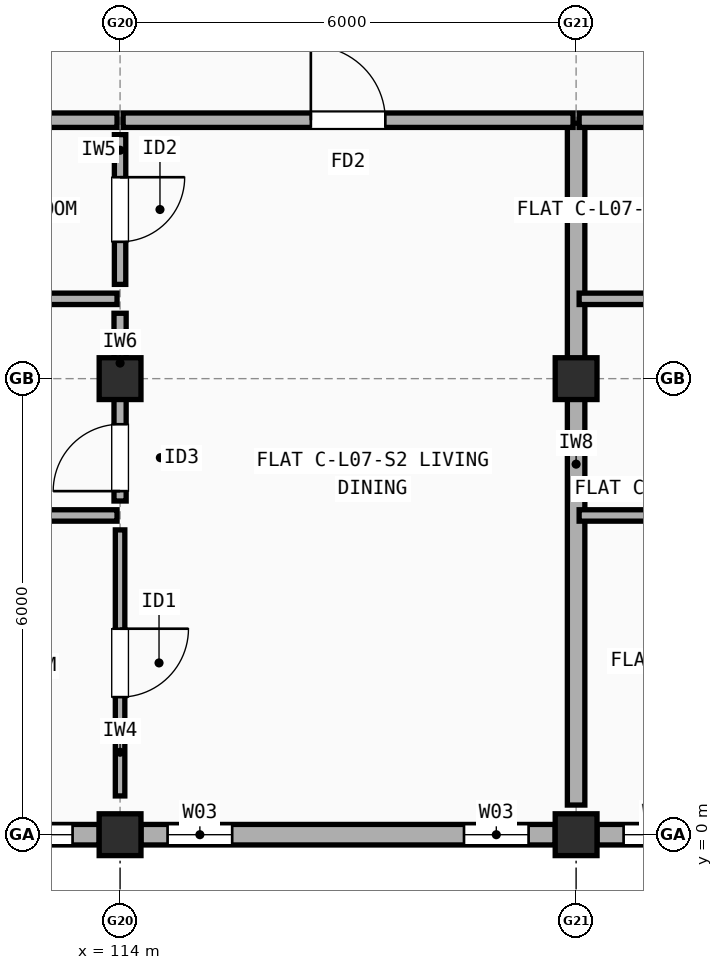
"""IFC4 building model, lengths in metres.
Left out: names, types, materials, properties, quantities, classifications, styles, units other than length and angle.
Written with IfcOpenShell. Run it as: python <this file> out.ifc"""

import sys

from ifc_helpers import new_model, si_unit, direction, frame, frame_2d, origin, origin_2d, place, context, subcontext, project, spatial, rectangle, extrude, element, fill, save


model = new_model("IFC4")
c1 = context("Model", 3, precision=1e-05, world=origin(), true_north=direction((0.0, 1.0)))
c2 = subcontext(c1, "Body", "Model", "MODEL_VIEW")
j1 = project(units=[si_unit("LENGTHUNIT", "METRE"), si_unit("PLANEANGLEUNIT", "RADIAN")], contexts=[c1])
p1 = place(None, origin())
s1 = spatial("IfcSite", under=j1, at=p1, CompositionType="ELEMENT")
p2 = place(p1, origin())
s2 = spatial("IfcBuilding", under=s1, at=p2, CompositionType="ELEMENT")
p3 = place(p2, frame((0.0, 0.0, 23.7)))
s3 = spatial("IfcBuildingStorey", under=s2, at=p3, CompositionType="ELEMENT", Elevation=23.7)
for number, where, z_axis, x_axis in (
    (1, (114.0, 0.0, 0.0), (0.0, 0.0, 1.0), (1.0, 0.0, 0.0)),
    (2, (114.0, 6.0, 0.0), (0.0, 0.0, 1.0), (1.0, 0.0, 0.0)),
    (3, (120.0, 0.0, 0.0), (0.0, 0.0, 1.0), (1.0, 0.0, 0.0)),
    (4, (120.0, 6.0, 0.0), (0.0, 0.0, 1.0), (1.0, 0.0, 0.0)),
):
    element("IfcColumn", number, at=place(p3, frame(where, z_axis=z_axis, x_axis=x_axis)), inside=s3, PredefinedType="COLUMN", context=c2, shape_type="SweptSolid", body=[
        extrude(rectangle(XDim=0.55, YDim=0.55, at=origin_2d()), origin(), (0.0, 0.0, 1.0), 2.975),
    ])
p4 = place(p3, frame((108.275, 0.0, 0.0), z_axis=(0.0, 0.0, 1.0), x_axis=(1.0, 0.0, 0.0)))
e5 = element("IfcWall", 5, at=p4, inside=s3, PredefinedType="STANDARD", context=c2, shape_type="SweptSolid", body=[
    extrude(rectangle(XDim=5.45, YDim=0.27, at=frame_2d((2.725, 0.0))), origin(), (0.0, 0.0, 1.0), 2.457),
])
p5 = place(p4, frame((1.615, 0.0, 0.9)))
e6 = element("IfcOpeningElement", 6, at=p5, cuts=e5, PredefinedType="OPENING", context=c2, shape_type="SweptSolid", body=[
    extrude(rectangle(XDim=1.2, YDim=1.35, at=frame_2d((0.6, 0.675))), frame((0.0, 0.145, 0.0), z_axis=(0.0, -1.0, 0.0), x_axis=(1.0, 0.0, 0.0)), (0.0, 0.0, 1.0), 0.29),
])
p6 = place(p4, frame((3.9, 0.0, 0.9)))
e7 = element("IfcOpeningElement", 7, at=p6, cuts=e5, PredefinedType="OPENING", context=c2, shape_type="SweptSolid", body=[
    extrude(rectangle(XDim=1.2, YDim=1.35, at=frame_2d((0.6, 0.675))), frame((0.0, 0.145, 0.0), z_axis=(0.0, -1.0, 0.0), x_axis=(1.0, 0.0, 0.0)), (0.0, 0.0, 1.0), 0.29),
])
p7 = place(p3, frame((114.275, 0.0, 0.0), z_axis=(0.0, 0.0, 1.0), x_axis=(1.0, 0.0, 0.0)))
e8 = element("IfcWall", 8, at=p7, inside=s3, PredefinedType="STANDARD", context=c2, shape_type="SweptSolid", body=[
    extrude(rectangle(XDim=5.45, YDim=0.27, at=frame_2d((2.725, 0.0))), origin(), (0.0, 0.0, 1.0), 2.457),
])
p8 = place(p7, frame((0.35, 0.0, 0.9)))
e9 = element("IfcOpeningElement", 9, at=p8, cuts=e8, PredefinedType="OPENING", context=c2, shape_type="SweptSolid", body=[
    extrude(rectangle(XDim=0.85, YDim=1.25, at=frame_2d((0.425, 0.625))), frame((0.0, 0.145, 0.0), z_axis=(0.0, -1.0, 0.0), x_axis=(1.0, 0.0, 0.0)), (0.0, 0.0, 1.0), 0.29),
])
p9 = place(p7, frame((4.25, 0.0, 0.9)))
e10 = element("IfcOpeningElement", 10, at=p9, cuts=e8, PredefinedType="OPENING", context=c2, shape_type="SweptSolid", body=[
    extrude(rectangle(XDim=0.85, YDim=1.25, at=frame_2d((0.425, 0.625))), frame((0.0, 0.145, 0.0), z_axis=(0.0, -1.0, 0.0), x_axis=(1.0, 0.0, 0.0)), (0.0, 0.0, 1.0), 0.29),
])
p10 = place(p3, frame((120.275, 0.0, 0.0), z_axis=(0.0, 0.0, 1.0), x_axis=(1.0, 0.0, 0.0)))
e11 = element("IfcWall", 11, at=p10, inside=s3, PredefinedType="STANDARD", context=c2, shape_type="SweptSolid", body=[
    extrude(rectangle(XDim=5.45, YDim=0.27, at=frame_2d((2.725, 0.0))), origin(), (0.0, 0.0, 1.0), 2.457),
])
p11 = place(p10, frame((0.35, 0.0, 0.9)))
e12 = element("IfcOpeningElement", 12, at=p11, cuts=e11, PredefinedType="OPENING", context=c2, shape_type="SweptSolid", body=[
    extrude(rectangle(XDim=0.95, YDim=1.35, at=frame_2d((0.475, 0.675))), frame((0.0, 0.145, 0.0), z_axis=(0.0, -1.0, 0.0), x_axis=(1.0, 0.0, 0.0)), (0.0, 0.0, 1.0), 0.29),
])
p12 = place(p10, frame((2.885, 0.0, 0.9)))
e13 = element("IfcOpeningElement", 13, at=p12, cuts=e11, PredefinedType="OPENING", context=c2, shape_type="SweptSolid", body=[
    extrude(rectangle(XDim=0.95, YDim=1.35, at=frame_2d((0.475, 0.675))), frame((0.0, 0.145, 0.0), z_axis=(0.0, -1.0, 0.0), x_axis=(1.0, 0.0, 0.0)), (0.0, 0.0, 1.0), 0.29),
])
p13 = place(p3, frame((120.0, 0.39, 0.0), z_axis=(0.0, 0.0, 1.0), x_axis=(0.0, 1.0, 0.0)))
e14 = element("IfcWall", 14, at=p13, inside=s3, PredefinedType="SOLIDWALL", context=c2, shape_type="SweptSolid", body=[
    extrude(rectangle(XDim=8.97, YDim=0.23, at=frame_2d((4.485, 0.0))), origin(), (0.0, 0.0, 1.0), 2.458),
])
p14 = place(p3, frame((109.54, 9.4, 0.0), z_axis=(0.0, 0.0, 1.0), x_axis=(1.0, 0.0, 0.0)))
e15 = element("IfcWall", 15, at=p14, inside=s3, PredefinedType="SOLIDWALL", context=c2, shape_type="SweptSolid", body=[
    extrude(rectangle(XDim=4.42, YDim=0.19, at=frame_2d((2.21, 0.0))), origin(), (0.0, 0.0, 1.0), 2.458),
])
p15 = place(p3, frame((114.04, 9.4, 0.0), z_axis=(0.0, 0.0, 1.0), x_axis=(1.0, 0.0, 0.0)))
e16 = element("IfcWall", 16, at=p15, inside=s3, PredefinedType="SOLIDWALL", context=c2, shape_type="SweptSolid", body=[
    extrude(rectangle(XDim=5.92, YDim=0.19, at=frame_2d((2.96, 0.0))), origin(), (0.0, 0.0, 1.0), 2.458),
])
p16 = place(p15, frame((2.47, 0.0, 0.0)))
e17 = element("IfcOpeningElement", 17, at=p16, cuts=e16, PredefinedType="OPENING", context=c2, shape_type="SweptSolid", body=[
    extrude(rectangle(XDim=0.98, YDim=2.15, at=frame_2d((0.49, 1.075))), frame((0.0, 0.105, 0.0), z_axis=(0.0, -1.0, 0.0), x_axis=(1.0, 0.0, 0.0)), (0.0, 0.0, 1.0), 0.21),
])
p17 = place(p3, frame((114.0, 0.51, 0.0), z_axis=(0.0, 0.0, 1.0), x_axis=(0.0, 1.0, 0.0)))
e18 = element("IfcWall", 18, at=p17, inside=s3, PredefinedType="PARTITIONING", context=c2, shape_type="SweptSolid", body=[
    extrude(rectangle(XDim=3.5, YDim=0.125, at=frame_2d((1.75, 0.0))), origin(), (0.0, 0.0, 1.0), 2.508),
])
p18 = place(p17, frame((1.3, 0.0, 0.0)))
e19 = element("IfcOpeningElement", 19, at=p18, cuts=e18, PredefinedType="OPENING", context=c2, shape_type="SweptSolid", body=[
    extrude(rectangle(XDim=0.9, YDim=2.1, at=frame_2d((0.45, 1.05))), frame((0.0, 0.073, 0.0), z_axis=(0.0, -1.0, 0.0), x_axis=(1.0, 0.0, 0.0)), (0.0, 0.0, 1.0), 0.145),
])
p19 = place(p3, frame((114.0, 4.39, 0.0), z_axis=(0.0, 0.0, 1.0), x_axis=(0.0, 1.0, 0.0)))
e20 = element("IfcWall", 20, at=p19, inside=s3, PredefinedType="PLUMBINGWALL", context=c2, shape_type="SweptSolid", body=[
    extrude(rectangle(XDim=2.47, YDim=0.16, at=frame_2d((1.235, 0.0))), origin(), (0.0, 0.0, 1.0), 2.458),
])
p20 = place(p19, frame((0.13, 0.0, 0.0)))
e21 = element("IfcOpeningElement", 21, at=p20, cuts=e20, PredefinedType="OPENING", context=c2, shape_type="SweptSolid", body=[
    extrude(rectangle(XDim=0.88, YDim=2.1, at=frame_2d((0.44, 1.05))), frame((0.0, 0.09, 0.0), z_axis=(0.0, -1.0, 0.0), x_axis=(1.0, 0.0, 0.0)), (0.0, 0.0, 1.0), 0.18),
])
p21 = place(p3, frame((114.0, 7.24, 0.0), z_axis=(0.0, 0.0, 1.0), x_axis=(0.0, 1.0, 0.0)))
e22 = element("IfcWall", 22, at=p21, inside=s3, PredefinedType="PARTITIONING", context=c2, shape_type="SweptSolid", body=[
    extrude(rectangle(XDim=1.97, YDim=0.15, at=frame_2d((0.985, 0.0))), origin(), (0.0, 0.0, 1.0), 2.458),
])
p22 = place(p21, frame((0.56, 0.0, 0.0)))
e23 = element("IfcOpeningElement", 23, at=p22, cuts=e22, PredefinedType="OPENING", context=c2, shape_type="SweptSolid", body=[
    extrude(rectangle(XDim=0.85, YDim=2.1, at=frame_2d((0.425, 1.05))), frame((0.0, 0.085, 0.0), z_axis=(0.0, -1.0, 0.0), x_axis=(1.0, 0.0, 0.0)), (0.0, 0.0, 1.0), 0.17),
])
p23 = place(p3, frame((109.54, 4.2, 0.0), z_axis=(0.0, 0.0, 1.0), x_axis=(1.0, 0.0, 0.0)))
e24 = element("IfcWall", 24, at=p23, inside=s3, PredefinedType="PARTITIONING", context=c2, shape_type="SweptSolid", body=[
    extrude(rectangle(XDim=4.42, YDim=0.15, at=frame_2d((2.21, 0.0))), origin(), (0.0, 0.0, 1.0), 2.508),
])
p24 = place(p3, frame((109.54, 7.05, 0.0), z_axis=(0.0, 0.0, 1.0), x_axis=(1.0, 0.0, 0.0)))
e25 = element("IfcWall", 25, at=p24, inside=s3, PredefinedType="PARTITIONING", context=c2, shape_type="SweptSolid", body=[
    extrude(rectangle(XDim=4.42, YDim=0.15, at=frame_2d((2.21, 0.0))), origin(), (0.0, 0.0, 1.0), 2.458),
])
p25 = place(p3, frame((120.04, 9.4, 0.0), z_axis=(0.0, 0.0, 1.0), x_axis=(1.0, 0.0, 0.0)))
e26 = element("IfcWall", 26, at=p25, inside=s3, PredefinedType="SOLIDWALL", context=c2, shape_type="SweptSolid", body=[
    extrude(rectangle(XDim=4.42, YDim=0.19, at=frame_2d((2.21, 0.0))), origin(), (0.0, 0.0, 1.0), 2.548),
])
p26 = place(p3, frame((120.04, 4.2, 0.0), z_axis=(0.0, 0.0, 1.0), x_axis=(1.0, 0.0, 0.0)))
e27 = element("IfcWall", 27, at=p26, inside=s3, PredefinedType="PARTITIONING", context=c2, shape_type="SweptSolid", body=[
    extrude(rectangle(XDim=4.42, YDim=0.15, at=frame_2d((2.21, 0.0))), origin(), (0.0, 0.0, 1.0), 2.458),
])
p27 = place(p3, frame((120.04, 7.05, 0.0), z_axis=(0.0, 0.0, 1.0), x_axis=(1.0, 0.0, 0.0)))
e28 = element("IfcWall", 28, at=p27, inside=s3, PredefinedType="PARTITIONING", context=c2, shape_type="SweptSolid", body=[
    extrude(rectangle(XDim=4.42, YDim=0.15, at=frame_2d((2.21, 0.0))), origin(), (0.0, 0.0, 1.0), 2.548),
])
p28 = place(p6, origin())
e29 = element("IfcWindow", 29, at=p28, inside=s3, PartitioningType="SINGLE_PANEL", PredefinedType="WINDOW", context=c2, shape_type="SweptSolid", body=[
    extrude(rectangle(XDim=1.2, YDim=1.35, at=frame_2d((0.6, 0.675))), frame((0.0, 0.03, 0.0), z_axis=(0.0, -1.0, 0.0), x_axis=(1.0, 0.0, 0.0)), (0.0, 0.0, 1.0), 0.06),
])
fill(e7, e29)
p29 = place(p8, origin())
e30 = element("IfcWindow", 30, at=p29, inside=s3, PartitioningType="SINGLE_PANEL", PredefinedType="WINDOW", context=c2, shape_type="SweptSolid", body=[
    extrude(rectangle(XDim=0.85, YDim=1.25, at=frame_2d((0.425, 0.625))), frame((0.0, 0.03, 0.0), z_axis=(0.0, -1.0, 0.0), x_axis=(1.0, 0.0, 0.0)), (0.0, 0.0, 1.0), 0.06),
])
fill(e9, e30)
p30 = place(p9, origin())
e31 = element("IfcWindow", 31, at=p30, inside=s3, PartitioningType="SINGLE_PANEL", PredefinedType="WINDOW", context=c2, shape_type="SweptSolid", body=[
    extrude(rectangle(XDim=0.85, YDim=1.25, at=frame_2d((0.425, 0.625))), frame((0.0, 0.03, 0.0), z_axis=(0.0, -1.0, 0.0), x_axis=(1.0, 0.0, 0.0)), (0.0, 0.0, 1.0), 0.06),
])
fill(e10, e31)
p31 = place(p11, origin())
e32 = element("IfcWindow", 32, at=p31, inside=s3, PartitioningType="SINGLE_PANEL", PredefinedType="WINDOW", context=c2, shape_type="SweptSolid", body=[
    extrude(rectangle(XDim=0.95, YDim=1.35, at=frame_2d((0.475, 0.675))), frame((0.0, 0.03, 0.0), z_axis=(0.0, -1.0, 0.0), x_axis=(1.0, 0.0, 0.0)), (0.0, 0.0, 1.0), 0.06),
])
fill(e12, e32)
p32 = place(p16, origin())
e33 = element("IfcDoor", 33, at=p32, inside=s3, OperationType="SINGLE_SWING_LEFT", PredefinedType="DOOR", context=c2, shape_type="SweptSolid", body=[
    extrude(rectangle(XDim=0.98, YDim=2.15, at=frame_2d((0.49, 1.075))), frame((0.0, 0.025, 0.0), z_axis=(0.0, -1.0, 0.0), x_axis=(1.0, 0.0, 0.0)), (0.0, 0.0, 1.0), 0.05),
])
fill(e17, e33)
p33 = place(p18, origin())
e34 = element("IfcDoor", 34, at=p33, inside=s3, OperationType="SINGLE_SWING_RIGHT", PredefinedType="DOOR", context=c2, shape_type="SweptSolid", body=[
    extrude(rectangle(XDim=0.9, YDim=2.1, at=frame_2d((0.45, 1.05))), frame((0.0, 0.025, 0.0), z_axis=(0.0, -1.0, 0.0), x_axis=(1.0, 0.0, 0.0)), (0.0, 0.0, 1.0), 0.05),
])
fill(e19, e34)
p34 = place(p20, origin())
e35 = element("IfcDoor", 35, at=p34, inside=s3, OperationType="SINGLE_SWING_LEFT", PredefinedType="DOOR", context=c2, shape_type="SweptSolid", body=[
    extrude(rectangle(XDim=0.88, YDim=2.1, at=frame_2d((0.44, 1.05))), frame((0.0, 0.025, 0.0), z_axis=(0.0, -1.0, 0.0), x_axis=(1.0, 0.0, 0.0)), (0.0, 0.0, 1.0), 0.05),
])
fill(e21, e35)
p35 = place(p22, origin())
e36 = element("IfcDoor", 36, at=p35, inside=s3, OperationType="SINGLE_SWING_RIGHT", PredefinedType="DOOR", context=c2, shape_type="SweptSolid", body=[
    extrude(rectangle(XDim=0.85, YDim=2.1, at=frame_2d((0.425, 1.05))), frame((0.0, 0.025, 0.0), z_axis=(0.0, -1.0, 0.0), x_axis=(1.0, 0.0, 0.0)), (0.0, 0.0, 1.0), 0.05),
])
fill(e23, e36)
save(model, sys.argv[1])
